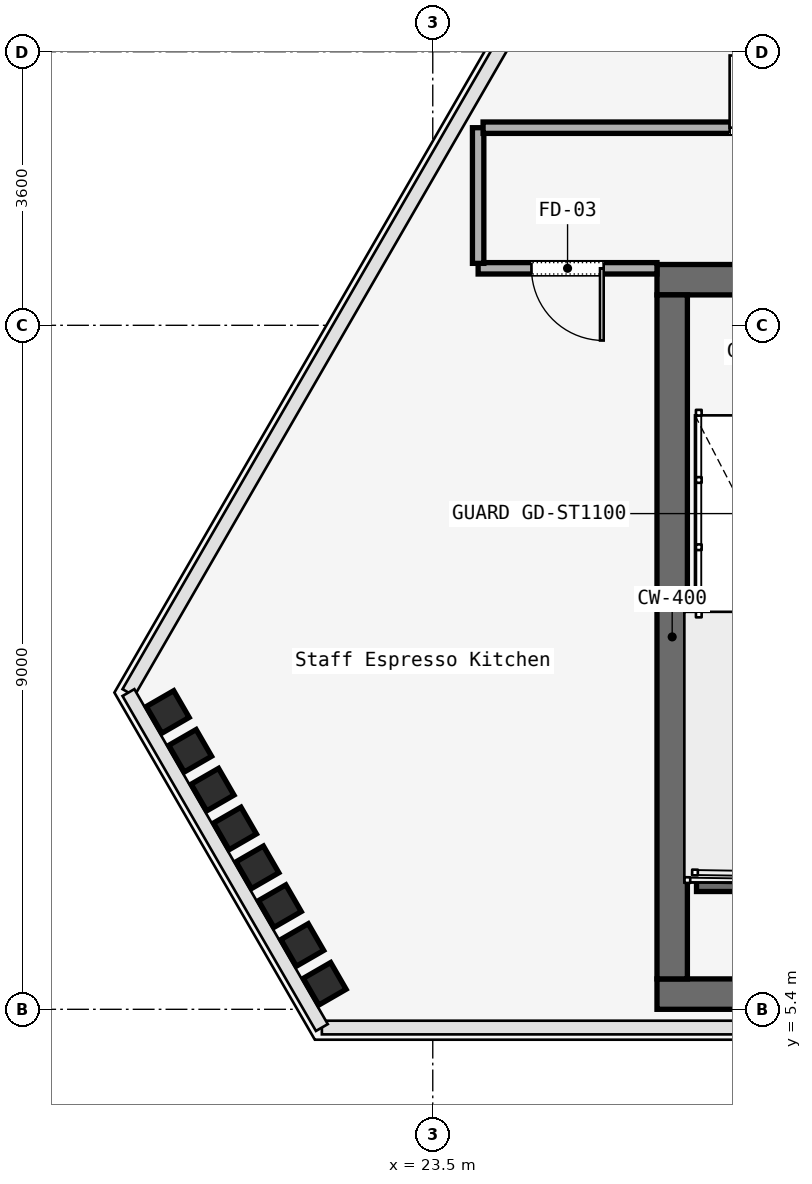
"""IFC4 building model, lengths in metres.
Left out: names, types, materials, properties, quantities, classifications, styles, units other than length and angle.
Written with IfcOpenShell. Run it as: python <this file> out.ifc"""

import sys

from ifc_helpers import new_model, si_unit, direction, frame, frame_2d, origin, origin_2d, place, context, subcontext, project, spatial, rectangle, i_section, extrude, element, fill, save


model = new_model("IFC4")
c1 = context("Model", 3, precision=1e-05, world=origin(), true_north=direction((0.0, 1.0)))
c2 = subcontext(c1, "Body", "Model", "MODEL_VIEW")
j1 = project(units=[si_unit("LENGTHUNIT", "METRE"), si_unit("PLANEANGLEUNIT", "RADIAN")], contexts=[c1])
p1 = place(None, origin())
s1 = spatial("IfcSite", under=j1, at=p1, CompositionType="ELEMENT")
p2 = place(p1, origin())
s2 = spatial("IfcBuilding", under=s1, at=p2, CompositionType="ELEMENT")
p3 = place(p2, frame((0.0, 0.0, 271.2)))
s3 = spatial("IfcBuildingStorey", under=s2, at=p3, CompositionType="ELEMENT", Elevation=271.2)
p4 = place(p3, frame((26.45, 15.0, 0.0), z_axis=(0.0, 0.0, 1.0), x_axis=(1.0, 0.0, 0.0)))
e1 = element("IfcWall", 1, at=p4, inside=s3, PredefinedType="SOLIDWALL", context=c2, shape_type="SweptSolid", body=[
    extrude(rectangle(XDim=31.1, YDim=0.4, at=frame_2d((15.55, 0.0))), origin(), (0.0, 0.0, 1.0), 3.58),
])
p5 = place(p4, frame((1.65, 0.0, 0.0)))
e2 = element("IfcOpeningElement", 2, at=p5, cuts=e1, PredefinedType="OPENING", context=c2, shape_type="SweptSolid", body=[
    extrude(rectangle(XDim=1.1, YDim=2.2, at=frame_2d((0.55, 1.1))), frame((0.0, 0.2, 0.0), z_axis=(0.0, -1.0, 0.0), x_axis=(1.0, 0.0, 0.0)), (0.0, 0.0, 1.0), 0.4),
])
p6 = place(p4, frame((13.65, 0.0, 0.0)))
e3 = element("IfcOpeningElement", 3, at=p6, cuts=e1, PredefinedType="OPENING", context=c2, shape_type="SweptSolid", body=[
    extrude(rectangle(XDim=1.1, YDim=2.2, at=frame_2d((0.55, 1.1))), frame((0.0, 0.2, 0.0), z_axis=(0.0, -1.0, 0.0), x_axis=(1.0, 0.0, 0.0)), (0.0, 0.0, 1.0), 0.4),
])
p7 = place(p4, frame((25.55, 0.0, 0.0)))
e4 = element("IfcOpeningElement", 4, at=p7, cuts=e1, PredefinedType="OPENING", context=c2, shape_type="SweptSolid", body=[
    extrude(rectangle(XDim=1.1, YDim=2.2, at=frame_2d((0.55, 1.1))), frame((0.0, 0.2, 0.0), z_axis=(0.0, -1.0, 0.0), x_axis=(1.0, 0.0, 0.0)), (0.0, 0.0, 1.0), 0.4),
])
p8 = place(p4, frame((19.35, 0.0, 0.0)))
e5 = element("IfcOpeningElement", 5, at=p8, cuts=e1, PredefinedType="OPENING", context=c2, shape_type="SweptSolid", body=[
    extrude(rectangle(XDim=1.1, YDim=2.2, at=frame_2d((0.55, 1.1))), frame((0.0, 0.2, 0.0), z_axis=(0.0, -1.0, 0.0), x_axis=(1.0, 0.0, 0.0)), (0.0, 0.0, 1.0), 0.4),
])
p9 = place(p4, frame((21.4, 0.0, 0.0)))
e6 = element("IfcOpeningElement", 6, at=p9, cuts=e1, PredefinedType="OPENING", context=c2, shape_type="SweptSolid", body=[
    extrude(rectangle(XDim=0.9, YDim=2.1, at=frame_2d((0.45, 1.05))), frame((0.0, 0.2, 0.0), z_axis=(0.0, -1.0, 0.0), x_axis=(1.0, 0.0, 0.0)), (0.0, 0.0, 1.0), 0.4),
])
p10 = place(p4, frame((6.04, 0.0, 0.0)))
e7 = element("IfcOpeningElement", 7, at=p10, cuts=e1, PredefinedType="OPENING", context=c2, shape_type="SweptSolid", body=[
    extrude(rectangle(XDim=0.95, YDim=2.2, at=frame_2d((0.475, 1.1))), frame((0.0, 0.2, 0.0), z_axis=(0.0, -1.0, 0.0), x_axis=(1.0, 0.0, 0.0)), (0.0, 0.0, 1.0), 0.4),
])
p11 = place(p4, frame((9.99, 0.0, 0.0)))
e8 = element("IfcOpeningElement", 8, at=p11, cuts=e1, PredefinedType="OPENING", context=c2, shape_type="SweptSolid", body=[
    extrude(rectangle(XDim=0.95, YDim=2.2, at=frame_2d((0.475, 1.1))), frame((0.0, 0.2, 0.0), z_axis=(0.0, -1.0, 0.0), x_axis=(1.0, 0.0, 0.0)), (0.0, 0.0, 1.0), 0.4),
])
p12 = place(p4, frame((23.35, 0.0, 0.0)))
e9 = element("IfcOpeningElement", 9, at=p12, cuts=e1, PredefinedType="OPENING", context=c2, shape_type="SweptSolid", body=[
    extrude(rectangle(XDim=1.3, YDim=2.3, at=frame_2d((0.65, 1.15))), frame((0.0, 0.2, 0.0), z_axis=(0.0, -1.0, 0.0), x_axis=(1.0, 0.0, 0.0)), (0.0, 0.0, 1.0), 0.4),
])
p13 = place(p3, frame((26.45, 5.6, 0.0), z_axis=(0.0, 0.0, 1.0), x_axis=(1.0, 0.0, 0.0)))
e10 = element("IfcWall", 10, at=p13, inside=s3, PredefinedType="SOLIDWALL", context=c2, shape_type="SweptSolid", body=[
    extrude(rectangle(XDim=31.1, YDim=0.4, at=frame_2d((15.55, 0.0))), origin(), (0.0, 0.0, 1.0), 3.58),
])
p14 = place(p3, frame((26.65, 5.8, 0.0), z_axis=(0.0, 0.0, 1.0), x_axis=(0.0, 1.0, 0.0)))
e11 = element("IfcWall", 11, at=p14, inside=s3, PredefinedType="SOLIDWALL", context=c2, shape_type="SweptSolid", body=[
    extrude(rectangle(XDim=9.0, YDim=0.4, at=frame_2d((4.5, 0.0))), origin(), (0.0, 0.0, 1.0), 3.58),
])
for number, where, z_axis, x_axis in (
    (12, (20.013, 9.312, 0.0), (0.0, 0.0, 1.0), (-0.5, 0.866, 0.0)),
    (13, (20.308, 8.801, 0.0), (0.0, 0.0, 1.0), (-0.5, 0.866, 0.0)),
    (14, (20.603, 8.29, 0.0), (0.0, 0.0, 1.0), (-0.5, 0.866, 0.0)),
    (15, (20.898, 7.779, 0.0), (0.0, 0.0, 1.0), (-0.5, 0.866, 0.0)),
    (16, (21.193, 7.268, 0.0), (0.0, 0.0, 1.0), (-0.5, 0.866, 0.0)),
    (17, (21.488, 6.757, 0.0), (0.0, 0.0, 1.0), (-0.5, 0.866, 0.0)),
    (18, (21.783, 6.246, 0.0), (0.0, 0.0, 1.0), (-0.5, 0.866, 0.0)),
    (19, (22.078, 5.736, 0.0), (0.0, 0.0, 1.0), (-0.5, 0.866, 0.0)),
):
    element("IfcColumn", number, at=place(p3, frame(where, z_axis=z_axis, x_axis=x_axis)), inside=s3, PredefinedType="COLUMN", context=c2, shape_type="SweptSolid", body=[
        extrude(i_section(OverallWidth=0.406, OverallDepth=0.416, WebThickness=0.03, FlangeThickness=0.037, FilletRadius=0.015, at=origin_2d()), origin(), (0.0, 0.0, 1.0), 3.58),
    ])
p15 = place(p3, frame((26.97, 7.05, 0.0), z_axis=(0.0, 0.0, 1.0), x_axis=(1.0, 0.0, 0.0)))
e20 = element("IfcWall", 20, at=p15, inside=s3, PredefinedType="SOLIDWALL", context=c2, shape_type="SweptSolid", body=[
    extrude(rectangle(XDim=3.115, YDim=0.2, at=frame_2d((1.558, 0.0))), origin(), (0.0, 0.0, 1.0), 3.8),
])
p16 = place(p3, frame((26.45, 15.15, 0.0), z_axis=(0.0, 0.0, 1.0), x_axis=(-1.0, 0.0, 0.0)))
e21 = element("IfcWall", 21, at=p16, inside=s3, PredefinedType="PARTITIONING", context=c2, shape_type="SweptSolid", body=[
    extrude(rectangle(XDim=2.353, YDim=0.15, at=frame_2d((1.177, 0.0))), origin(), (0.0, 0.0, 1.0), 3.01),
])
p17 = place(p16, frame((0.701, 0.0, 0.0)))
e22 = element("IfcOpeningElement", 22, at=p17, cuts=e21, PredefinedType="OPENING", context=c2, shape_type="SweptSolid", body=[
    extrude(rectangle(XDim=0.95, YDim=2.2, at=frame_2d((0.475, 1.1))), frame((0.0, 0.075, 0.0), z_axis=(0.0, -1.0, 0.0), x_axis=(1.0, 0.0, 0.0)), (0.0, 0.0, 1.0), 0.15),
])
p18 = place(p3, frame((24.097, 15.215, 0.0), z_axis=(0.0, 0.0, 1.0), x_axis=(0.0, 1.0, 0.0)))
e23 = element("IfcWall", 23, at=p18, inside=s3, PredefinedType="PARTITIONING", context=c2, shape_type="SweptSolid", body=[
    extrude(rectangle(XDim=1.785, YDim=0.15, at=frame_2d((0.893, 0.0))), origin(), (0.0, 0.0, 1.0), 3.01),
])
p19 = place(p3, frame((24.162, 17.0, 0.0), z_axis=(0.0, 0.0, 1.0), x_axis=(1.0, 0.0, 0.0)))
e24 = element("IfcWall", 24, at=p19, inside=s3, PredefinedType="PARTITIONING", context=c2, shape_type="SweptSolid", body=[
    extrude(rectangle(XDim=7.438, YDim=0.15, at=frame_2d((3.719, 0.0))), origin(), (0.0, 0.0, 1.0), 3.01),
])
p20 = place(p19, frame((3.244, 0.0, 0.0)))
e25 = element("IfcOpeningElement", 25, at=p20, cuts=e24, PredefinedType="OPENING", context=c2, shape_type="SweptSolid", body=[
    extrude(rectangle(XDim=0.95, YDim=2.2, at=frame_2d((0.475, 1.1))), frame((0.0, 0.075, 0.0), z_axis=(0.0, -1.0, 0.0), x_axis=(1.0, 0.0, 0.0)), (0.0, 0.0, 1.0), 0.15),
])
p21 = place(p17, origin())
e26 = element("IfcDoor", 26, at=p21, inside=s3, OperationType="SINGLE_SWING_RIGHT", PredefinedType="DOOR", context=c2, shape_type="SweptSolid", body=[
    extrude(rectangle(XDim=0.95, YDim=2.2, at=frame_2d((0.475, 1.1))), frame((0.0, 0.025, 0.0), z_axis=(0.0, -1.0, 0.0), x_axis=(1.0, 0.0, 0.0)), (0.0, 0.0, 1.0), 0.05),
])
fill(e22, e26)
p22 = place(p20, origin())
e27 = element("IfcDoor", 27, at=p22, inside=s3, OperationType="SINGLE_SWING_LEFT", PredefinedType="DOOR", context=c2, shape_type="SweptSolid", body=[
    extrude(rectangle(XDim=0.95, YDim=2.2, at=frame_2d((0.475, 1.1))), frame((0.0, 0.025, 0.0), z_axis=(0.0, -1.0, 0.0), x_axis=(1.0, 0.0, 0.0)), (0.0, 0.0, 1.0), 0.05),
])
fill(e25, e27)
save(model, sys.argv[1])
